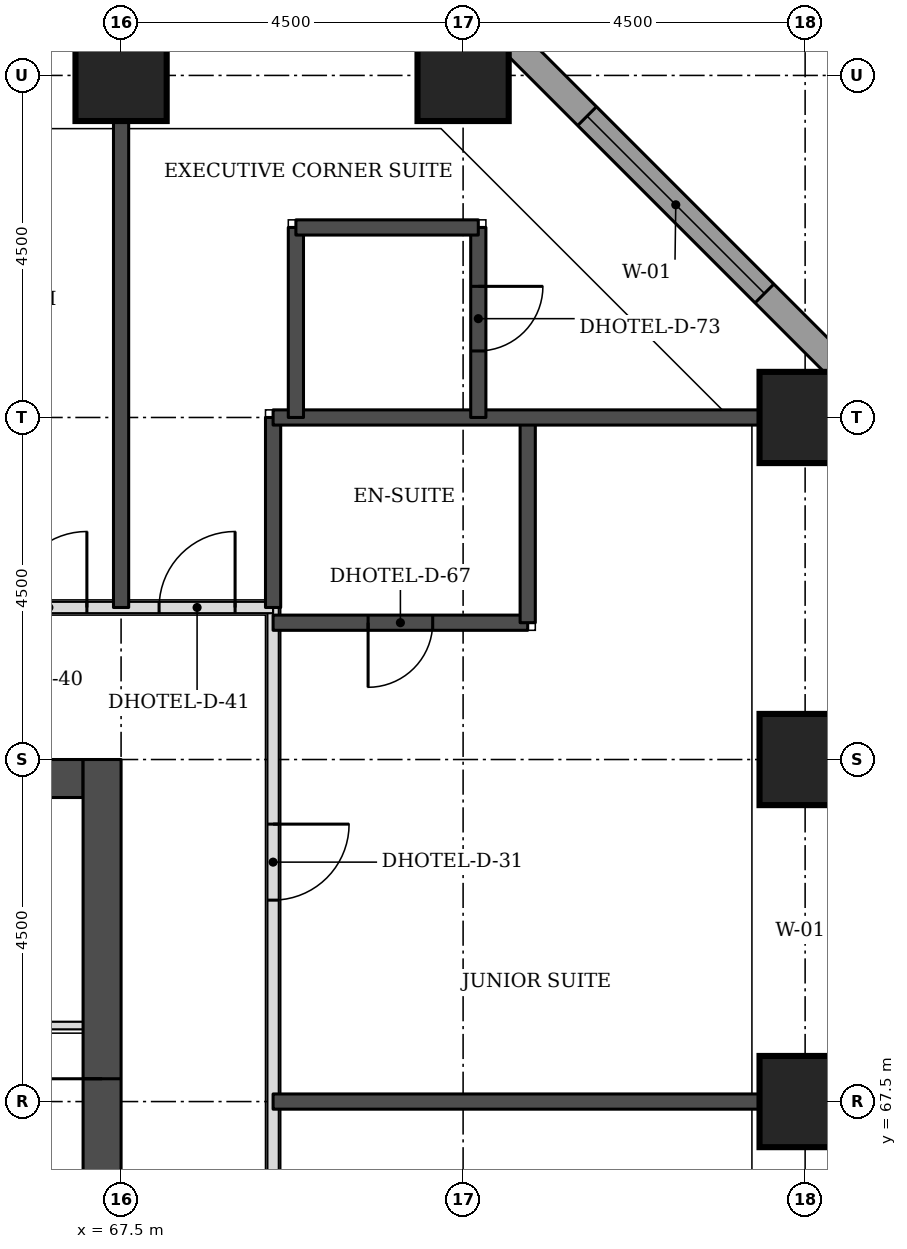
"""IFC4 building model, lengths in metres.
Left out: names, types, materials, properties, quantities, classifications, styles, units other than length and angle.
Written with IfcOpenShell. Run it as: python <this file> out.ifc"""

import sys

from ifc_helpers import new_model, si_unit, direction, frame, frame_2d, origin, origin_2d, place, context, subcontext, project, spatial, rectangle, extrude, element, fill, save


model = new_model("IFC4")
c1 = context("Model", 3, precision=1e-05, world=origin(), true_north=direction((0.0, 1.0)))
c2 = subcontext(c1, "Body", "Model", "MODEL_VIEW")
j1 = project(units=[si_unit("LENGTHUNIT", "METRE"), si_unit("PLANEANGLEUNIT", "RADIAN")], contexts=[c1])
p1 = place(None, origin())
s1 = spatial("IfcSite", under=j1, at=p1, CompositionType="ELEMENT")
p2 = place(p1, origin())
s2 = spatial("IfcBuilding", under=s1, at=p2, CompositionType="ELEMENT")
p3 = place(p2, frame((0.0, 0.0, 36.3)))
s3 = spatial("IfcBuildingStorey", under=s2, at=p3, CompositionType="ELEMENT", Elevation=36.3)
for number, where, z_axis, x_axis in (
    (1, (76.5, 67.5, 0.0), (0.0, 0.0, 1.0), (1.0, 0.0, 0.0)),
    (2, (76.5, 72.0, 0.0), (0.0, 0.0, 1.0), (1.0, 0.0, 0.0)),
    (3, (76.5, 76.5, 0.0), (0.0, 0.0, 1.0), (1.0, 0.0, 0.0)),
    (4, (67.5, 81.0, 0.0), (0.0, 0.0, 1.0), (1.0, 0.0, 0.0)),
    (5, (72.0, 81.0, 0.0), (0.0, 0.0, 1.0), (1.0, 0.0, 0.0)),
):
    element("IfcColumn", number, at=place(p3, frame(where, z_axis=z_axis, x_axis=x_axis)), inside=s3, PredefinedType="COLUMN", context=c2, shape_type="SweptSolid", body=[
        extrude(rectangle(XDim=1.2, YDim=1.2, at=origin_2d()), origin(), (0.0, 0.0, 1.0), 3.3),
    ])
p4 = place(p3, frame((45.5, 71.75, 0.0), z_axis=(0.0, 0.0, 1.0), x_axis=(1.0, 0.0, 0.0)))
e6 = element("IfcWall", 6, at=p4, inside=s3, PredefinedType="SHEAR", context=c2, shape_type="SweptSolid", body=[
    extrude(rectangle(XDim=21.5, YDim=0.5, at=frame_2d((10.75, 0.0))), origin(), (0.0, 0.0, 1.0), 3.3),
])
p5 = place(p3, frame((67.25, 49.5, 0.0), z_axis=(0.0, 0.0, 1.0), x_axis=(0.0, 1.0, 0.0)))
e7 = element("IfcWall", 7, at=p5, inside=s3, PredefinedType="SHEAR", context=c2, shape_type="SweptSolid", body=[
    extrude(rectangle(XDim=22.5, YDim=0.5, at=frame_2d((11.25, 0.0))), origin(), (0.0, 0.0, 1.0), 3.3),
])
p6 = place(p5, frame((4.2, 0.0, 0.0)))
e8 = element("IfcOpeningElement", 8, at=p6, cuts=e7, PredefinedType="OPENING", context=c2, shape_type="SweptSolid", body=[
    extrude(rectangle(XDim=1.8, YDim=2.1, at=frame_2d((0.9, 1.05))), frame((0.0, 0.26, 0.0), z_axis=(0.0, -1.0, 0.0), x_axis=(1.0, 0.0, 0.0)), (0.0, 0.0, 1.0), 0.52),
])
p7 = place(p5, frame((6.9, 0.0, 0.0)))
e9 = element("IfcOpeningElement", 9, at=p7, cuts=e7, PredefinedType="OPENING", context=c2, shape_type="SweptSolid", body=[
    extrude(rectangle(XDim=1.1, YDim=2.1, at=frame_2d((0.55, 1.05))), frame((0.0, 0.26, 0.0), z_axis=(0.0, -1.0, 0.0), x_axis=(1.0, 0.0, 0.0)), (0.0, 0.0, 1.0), 0.52),
])
p8 = place(p5, frame((13.6, 0.0, 0.0)))
e10 = element("IfcOpeningElement", 10, at=p8, cuts=e7, PredefinedType="OPENING", context=c2, shape_type="SweptSolid", body=[
    extrude(rectangle(XDim=1.1, YDim=2.1, at=frame_2d((0.55, 1.05))), frame((0.0, 0.26, 0.0), z_axis=(0.0, -1.0, 0.0), x_axis=(1.0, 0.0, 0.0)), (0.0, 0.0, 1.0), 0.52),
])
p9 = place(p5, frame((16.5, 0.0, 0.0)))
e11 = element("IfcOpeningElement", 11, at=p9, cuts=e7, PredefinedType="OPENING", context=c2, shape_type="SweptSolid", body=[
    extrude(rectangle(XDim=1.8, YDim=2.1, at=frame_2d((0.9, 1.05))), frame((0.0, 0.26, 0.0), z_axis=(0.0, -1.0, 0.0), x_axis=(1.0, 0.0, 0.0)), (0.0, 0.0, 1.0), 0.52),
])
p10 = place(p3, frame((77.326, 76.77, 0.0), z_axis=(0.0, 0.0, 1.0), x_axis=(-0.707106781187, 0.707106781187, 0.0)))
e12 = element("IfcWall", 12, at=p10, inside=s3, PredefinedType="STANDARD", context=c2, shape_type="SweptSolid", body=[
    extrude(rectangle(XDim=7.151, YDim=0.35, at=frame_2d((3.576, 0.0))), origin(), (0.0, 0.0, 1.0), 3.055),
])
p11 = place(p10, frame((1.926, 0.0, 0.8)))
e13 = element("IfcOpeningElement", 13, at=p11, cuts=e12, PredefinedType="OPENING", context=c2, shape_type="SweptSolid", body=[
    extrude(rectangle(XDim=3.3, YDim=1.5, at=frame_2d((1.65, 0.75))), frame((0.0, 0.185, 0.0), z_axis=(0.0, -1.0, 0.0), x_axis=(1.0, 0.0, 0.0)), (0.0, 0.0, 1.0), 0.37),
])
p12 = place(p3, frame((69.5, 47.5, 0.0), z_axis=(0.0, 0.0, 1.0), x_axis=(0.0, 1.0, 0.0)))
e14 = element("IfcWall", 14, at=p12, inside=s3, PredefinedType="PARTITIONING", context=c2, shape_type="SweptSolid", body=[
    extrude(rectangle(XDim=26.5, YDim=0.15, at=frame_2d((13.25, 0.0))), origin(), (0.0, 0.0, 1.0), 3.08),
])
p13 = place(p12, frame((22.65, 0.0, 0.0)))
e15 = element("IfcOpeningElement", 15, at=p13, cuts=e14, PredefinedType="OPENING", context=c2, shape_type="SweptSolid", body=[
    extrude(rectangle(XDim=1.0, YDim=2.1, at=frame_2d((0.5, 1.05))), frame((0.0, 0.085, 0.0), z_axis=(0.0, -1.0, 0.0), x_axis=(1.0, 0.0, 0.0)), (0.0, 0.0, 1.0), 0.17),
])
p14 = place(p12, frame((16.6, 0.0, 0.0)))
e16 = element("IfcOpeningElement", 16, at=p14, cuts=e14, PredefinedType="OPENING", context=c2, shape_type="SweptSolid", body=[
    extrude(rectangle(XDim=1.0, YDim=2.1, at=frame_2d((0.5, 1.05))), frame((0.0, 0.085, 0.0), z_axis=(0.0, -1.0, 0.0), x_axis=(1.0, 0.0, 0.0)), (0.0, 0.0, 1.0), 0.17),
])
p15 = place(p12, frame((4.25, 0.0, 0.0)))
e17 = element("IfcOpeningElement", 17, at=p15, cuts=e14, PredefinedType="OPENING", context=c2, shape_type="SweptSolid", body=[
    extrude(rectangle(XDim=1.1, YDim=2.1, at=frame_2d((0.55, 1.05))), frame((0.0, 0.085, 0.0), z_axis=(0.0, -1.0, 0.0), x_axis=(1.0, 0.0, 0.0)), (0.0, 0.0, 1.0), 0.17),
])
p16 = place(p12, frame((0.55, 0.0, 0.0)))
e18 = element("IfcOpeningElement", 18, at=p16, cuts=e14, PredefinedType="OPENING", context=c2, shape_type="SweptSolid", body=[
    extrude(rectangle(XDim=1.0, YDim=2.1, at=frame_2d((0.5, 1.05))), frame((0.0, 0.085, 0.0), z_axis=(0.0, -1.0, 0.0), x_axis=(1.0, 0.0, 0.0)), (0.0, 0.0, 1.0), 0.17),
])
p17 = place(p3, frame((43.0, 74.0, 0.0), z_axis=(0.0, 0.0, 1.0), x_axis=(1.0, 0.0, 0.0)))
e19 = element("IfcWall", 19, at=p17, inside=s3, PredefinedType="PARTITIONING", context=c2, shape_type="SweptSolid", body=[
    extrude(rectangle(XDim=26.5, YDim=0.15, at=frame_2d((13.25, 0.0))), origin(), (0.0, 0.0, 1.0), 3.08),
])
p18 = place(p17, frame((7.6, 0.0, 0.0)))
e20 = element("IfcOpeningElement", 20, at=p18, cuts=e19, PredefinedType="OPENING", context=c2, shape_type="SweptSolid", body=[
    extrude(rectangle(XDim=1.0, YDim=2.1, at=frame_2d((0.5, 1.05))), frame((0.0, 0.085, 0.0), z_axis=(0.0, -1.0, 0.0), x_axis=(1.0, 0.0, 0.0)), (0.0, 0.0, 1.0), 0.17),
])
p19 = place(p17, frame((13.65, 0.0, 0.0)))
e21 = element("IfcOpeningElement", 21, at=p19, cuts=e19, PredefinedType="OPENING", context=c2, shape_type="SweptSolid", body=[
    extrude(rectangle(XDim=1.0, YDim=2.1, at=frame_2d((0.5, 1.05))), frame((0.0, 0.085, 0.0), z_axis=(0.0, -1.0, 0.0), x_axis=(1.0, 0.0, 0.0)), (0.0, 0.0, 1.0), 0.17),
])
p20 = place(p17, frame((23.05, 0.0, 0.0)))
e22 = element("IfcOpeningElement", 22, at=p20, cuts=e19, PredefinedType="OPENING", context=c2, shape_type="SweptSolid", body=[
    extrude(rectangle(XDim=1.0, YDim=2.1, at=frame_2d((0.5, 1.05))), frame((0.0, 0.085, 0.0), z_axis=(0.0, -1.0, 0.0), x_axis=(1.0, 0.0, 0.0)), (0.0, 0.0, 1.0), 0.17),
])
p21 = place(p17, frame((0.5, 0.0, 0.0)))
e23 = element("IfcOpeningElement", 23, at=p21, cuts=e19, PredefinedType="OPENING", context=c2, shape_type="SweptSolid", body=[
    extrude(rectangle(XDim=1.0, YDim=2.1, at=frame_2d((0.5, 1.05))), frame((0.0, 0.085, 0.0), z_axis=(0.0, -1.0, 0.0), x_axis=(1.0, 0.0, 0.0)), (0.0, 0.0, 1.0), 0.17),
])
p22 = place(p17, frame((25.0, 0.0, 0.0)))
e24 = element("IfcOpeningElement", 24, at=p22, cuts=e19, PredefinedType="OPENING", context=c2, shape_type="SweptSolid", body=[
    extrude(rectangle(XDim=1.0, YDim=2.1, at=frame_2d((0.5, 1.05))), frame((0.0, 0.085, 0.0), z_axis=(0.0, -1.0, 0.0), x_axis=(1.0, 0.0, 0.0)), (0.0, 0.0, 1.0), 0.17),
])
p23 = place(p3, frame((69.5, 67.5, 0.0), z_axis=(0.0, 0.0, 1.0), x_axis=(1.0, 0.0, 0.0)))
e25 = element("IfcWall", 25, at=p23, inside=s3, PredefinedType="SOLIDWALL", context=c2, shape_type="SweptSolid", body=[
    extrude(rectangle(XDim=6.4, YDim=0.2, at=frame_2d((3.2, 0.0))), origin(), (0.0, 0.0, 1.0), 3.08),
])
p24 = place(p3, frame((69.5, 73.8, 0.0), z_axis=(0.0, 0.0, 1.0), x_axis=(1.0, 0.0, 0.0)))
e26 = element("IfcWall", 26, at=p24, inside=s3, PredefinedType="SOLIDWALL", context=c2, shape_type="SweptSolid", body=[
    extrude(rectangle(XDim=3.35, YDim=0.2, at=frame_2d((1.675, 0.0))), origin(), (0.0, 0.0, 1.0), 3.08),
])
p25 = place(p24, frame((1.25, 0.0, 0.0)))
e27 = element("IfcOpeningElement", 27, at=p25, cuts=e26, PredefinedType="OPENING", context=c2, shape_type="SweptSolid", body=[
    extrude(rectangle(XDim=0.85, YDim=2.1, at=frame_2d((0.425, 1.05))), frame((0.0, 0.11, 0.0), z_axis=(0.0, -1.0, 0.0), x_axis=(1.0, 0.0, 0.0)), (0.0, 0.0, 1.0), 0.22),
])
p26 = place(p3, frame((72.85, 73.8, 0.0), z_axis=(0.0, 0.0, 1.0), x_axis=(0.0, 1.0, 0.0)))
e28 = element("IfcWall", 28, at=p26, inside=s3, PredefinedType="SOLIDWALL", context=c2, shape_type="SweptSolid", body=[
    extrude(rectangle(XDim=2.7, YDim=0.2, at=frame_2d((1.35, 0.0))), origin(), (0.0, 0.0, 1.0), 3.08),
])
p27 = place(p3, frame((67.5, 74.0, 0.0), z_axis=(0.0, 0.0, 1.0), x_axis=(0.0, 1.0, 0.0)))
e29 = element("IfcWall", 29, at=p27, inside=s3, PredefinedType="SOLIDWALL", context=c2, shape_type="SweptSolid", body=[
    extrude(rectangle(XDim=6.4, YDim=0.2, at=frame_2d((3.2, 0.0))), origin(), (0.0, 0.0, 1.0), 3.08),
])
p28 = place(p3, frame((69.5, 74.0, 0.0), z_axis=(0.0, 0.0, 1.0), x_axis=(0.0, 1.0, 0.0)))
e30 = element("IfcWall", 30, at=p28, inside=s3, PredefinedType="SOLIDWALL", context=c2, shape_type="SweptSolid", body=[
    extrude(rectangle(XDim=2.5, YDim=0.2, at=frame_2d((1.25, 0.0))), origin(), (0.0, 0.0, 1.0), 3.08),
])
p29 = place(p3, frame((69.5, 76.5, 0.0), z_axis=(0.0, 0.0, 1.0), x_axis=(1.0, 0.0, 0.0)))
e31 = element("IfcWall", 31, at=p29, inside=s3, PredefinedType="SOLIDWALL", context=c2, shape_type="SweptSolid", body=[
    extrude(rectangle(XDim=6.4, YDim=0.2, at=frame_2d((3.2, 0.0))), origin(), (0.0, 0.0, 1.0), 3.08),
])
p30 = place(p3, frame((69.8, 76.5, 0.0), z_axis=(0.0, 0.0, 1.0), x_axis=(0.0, 1.0, 0.0)))
e32 = element("IfcWall", 32, at=p30, inside=s3, PredefinedType="SOLIDWALL", context=c2, shape_type="SweptSolid", body=[
    extrude(rectangle(XDim=2.5, YDim=0.2, at=frame_2d((1.25, 0.0))), origin(), (0.0, 0.0, 1.0), 3.08),
])
p31 = place(p3, frame((72.2, 76.5, 0.0), z_axis=(0.0, 0.0, 1.0), x_axis=(0.0, 1.0, 0.0)))
e33 = element("IfcWall", 33, at=p31, inside=s3, PredefinedType="SOLIDWALL", context=c2, shape_type="SweptSolid", body=[
    extrude(rectangle(XDim=2.5, YDim=0.2, at=frame_2d((1.25, 0.0))), origin(), (0.0, 0.0, 1.0), 3.08),
])
p32 = place(p31, frame((0.875, 0.0, 0.0)))
e34 = element("IfcOpeningElement", 34, at=p32, cuts=e33, PredefinedType="OPENING", context=c2, shape_type="SweptSolid", body=[
    extrude(rectangle(XDim=0.85, YDim=2.1, at=frame_2d((0.425, 1.05))), frame((0.0, 0.11, 0.0), z_axis=(0.0, -1.0, 0.0), x_axis=(1.0, 0.0, 0.0)), (0.0, 0.0, 1.0), 0.22),
])
p33 = place(p3, frame((69.8, 79.0, 0.0), z_axis=(0.0, 0.0, 1.0), x_axis=(1.0, 0.0, 0.0)))
e35 = element("IfcWall", 35, at=p33, inside=s3, PredefinedType="SOLIDWALL", context=c2, shape_type="SweptSolid", body=[
    extrude(rectangle(XDim=2.4, YDim=0.2, at=frame_2d((1.2, 0.0))), origin(), (0.0, 0.0, 1.0), 3.08),
])
p34 = place(p3, frame((61.85, 68.5, 0.0), z_axis=(0.0, 0.0, 1.0), x_axis=(1.0, 0.0, 0.0)))
e36 = element("IfcWall", 36, at=p34, inside=s3, PredefinedType="PARTITIONING", context=c2, shape_type="SweptSolid", body=[
    extrude(rectangle(XDim=5.15, YDim=0.1, at=frame_2d((2.575, 0.0))), origin(), (0.0, 0.0, 1.0), 3.08),
])
p35 = place(p34, frame((3.026, 0.0, 0.0)))
e37 = element("IfcOpeningElement", 37, at=p35, cuts=e36, PredefinedType="OPENING", context=c2, shape_type="SweptSolid", body=[
    extrude(rectangle(XDim=0.9, YDim=2.1, at=frame_2d((0.45, 1.05))), frame((0.0, 0.06, 0.0), z_axis=(0.0, -1.0, 0.0), x_axis=(1.0, 0.0, 0.0)), (0.0, 0.0, 1.0), 0.12),
])
p36 = place(p34, frame((0.451, 0.0, 0.0)))
e38 = element("IfcOpeningElement", 38, at=p36, cuts=e36, PredefinedType="OPENING", context=c2, shape_type="SweptSolid", body=[
    extrude(rectangle(XDim=0.9, YDim=2.1, at=frame_2d((0.45, 1.05))), frame((0.0, 0.06, 0.0), z_axis=(0.0, -1.0, 0.0), x_axis=(1.0, 0.0, 0.0)), (0.0, 0.0, 1.0), 0.12),
])
p37 = place(p11, origin())
e39 = element("IfcWindow", 39, at=p37, inside=s3, PartitioningType="SINGLE_PANEL", PredefinedType="WINDOW", context=c2, shape_type="SweptSolid", body=[
    extrude(rectangle(XDim=3.3, YDim=1.5, at=frame_2d((1.65, 0.75))), frame((0.0, 0.085, 0.0), z_axis=(0.0, -1.0, 0.0), x_axis=(1.0, 0.0, 0.0)), (0.0, 0.0, 1.0), 0.06),
])
fill(e13, e39)
p38 = place(p20, origin())
e40 = element("IfcDoor", 40, at=p38, inside=s3, OperationType="SINGLE_SWING_RIGHT", PredefinedType="DOOR", context=c2, shape_type="SweptSolid", body=[
    extrude(rectangle(XDim=1.0, YDim=2.1, at=frame_2d((0.5, 1.05))), frame((0.0, 0.025, 0.0), z_axis=(0.0, -1.0, 0.0), x_axis=(1.0, 0.0, 0.0)), (0.0, 0.0, 1.0), 0.05),
])
fill(e22, e40)
p39 = place(p13, frame((1.0, 0.0, 0.0), z_axis=(0.0, 0.0, 1.0), x_axis=(-1.0, 0.0, 0.0)))
e41 = element("IfcDoor", 41, at=p39, inside=s3, OperationType="SINGLE_SWING_LEFT", PredefinedType="DOOR", context=c2, shape_type="SweptSolid", body=[
    extrude(rectangle(XDim=1.0, YDim=2.1, at=frame_2d((0.5, 1.05))), frame((0.0, 0.025, 0.0), z_axis=(0.0, -1.0, 0.0), x_axis=(1.0, 0.0, 0.0)), (0.0, 0.0, 1.0), 0.05),
])
fill(e15, e41)
p40 = place(p25, frame((0.85, 0.0, 0.0), z_axis=(0.0, 0.0, 1.0), x_axis=(-1.0, 0.0, 0.0)))
e42 = element("IfcDoor", 42, at=p40, inside=s3, OperationType="SINGLE_SWING_RIGHT", PredefinedType="DOOR", context=c2, shape_type="SweptSolid", body=[
    extrude(rectangle(XDim=0.85, YDim=2.1, at=frame_2d((0.425, 1.05))), frame((0.0, 0.025, 0.0), z_axis=(0.0, -1.0, 0.0), x_axis=(1.0, 0.0, 0.0)), (0.0, 0.0, 1.0), 0.05),
])
fill(e27, e42)
p41 = place(p22, origin())
e43 = element("IfcDoor", 43, at=p41, inside=s3, OperationType="SINGLE_SWING_RIGHT", PredefinedType="DOOR", context=c2, shape_type="SweptSolid", body=[
    extrude(rectangle(XDim=1.0, YDim=2.1, at=frame_2d((0.5, 1.05))), frame((0.0, 0.025, 0.0), z_axis=(0.0, -1.0, 0.0), x_axis=(1.0, 0.0, 0.0)), (0.0, 0.0, 1.0), 0.05),
])
fill(e24, e43)
p42 = place(p32, frame((0.85, 0.0, 0.0), z_axis=(0.0, 0.0, 1.0), x_axis=(-1.0, 0.0, 0.0)))
e44 = element("IfcDoor", 44, at=p42, inside=s3, OperationType="SINGLE_SWING_LEFT", PredefinedType="DOOR", context=c2, shape_type="SweptSolid", body=[
    extrude(rectangle(XDim=0.85, YDim=2.1, at=frame_2d((0.425, 1.05))), frame((0.0, 0.025, 0.0), z_axis=(0.0, -1.0, 0.0), x_axis=(1.0, 0.0, 0.0)), (0.0, 0.0, 1.0), 0.05),
])
fill(e34, e44)
p43 = place(p9, origin())
e45 = element("IfcDoor", 45, at=p43, inside=s3, OperationType="SINGLE_SWING_RIGHT", PredefinedType="DOOR", context=c2, shape_type="SweptSolid", body=[
    extrude(rectangle(XDim=1.8, YDim=2.1, at=frame_2d((0.9, 1.05))), frame((0.0, 0.025, 0.0), z_axis=(0.0, -1.0, 0.0), x_axis=(1.0, 0.0, 0.0)), (0.0, 0.0, 1.0), 0.05),
])
fill(e11, e45)
save(model, sys.argv[1])
